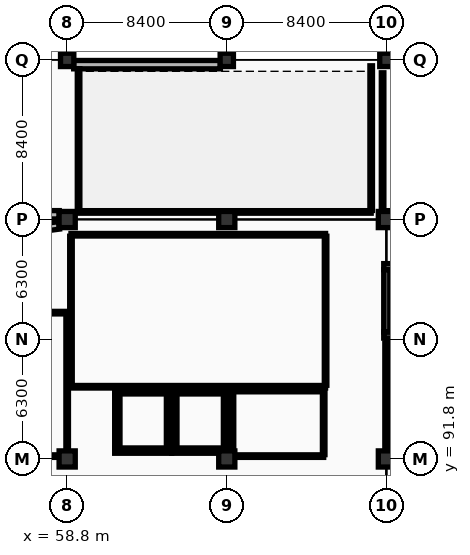
"""IFC4 building model, lengths in metres.
Left out: names, types, materials, properties, quantities, classifications, styles, units other than length and angle.
Written with IfcOpenShell. Run it as: python <this file> out.ifc"""

import sys

from ifc_helpers import new_model, si_unit, direction, frame, frame_2d, origin, origin_2d, place, context, subcontext, project, spatial, rectangle, extrude, element, fill, save


model = new_model("IFC4")
c1 = context("Model", 3, precision=1e-05, world=origin(), true_north=direction((0.0, 1.0)))
c2 = subcontext(c1, "Body", "Model", "MODEL_VIEW")
j1 = project(units=[si_unit("LENGTHUNIT", "METRE"), si_unit("PLANEANGLEUNIT", "RADIAN")], contexts=[c1])
p1 = place(None, origin())
s1 = spatial("IfcSite", under=j1, at=p1, CompositionType="ELEMENT")
p2 = place(p1, origin())
s2 = spatial("IfcBuilding", under=s1, at=p2, CompositionType="ELEMENT")
p3 = place(p2, origin())
s3 = spatial("IfcBuildingStorey", under=s2, at=p3, CompositionType="ELEMENT", Elevation=0.0)
for number, where, z_axis, x_axis in (
    (1, (58.8, 91.8, 0.0), (0.0, 0.0, 1.0), (1.0, 0.0, 0.0)),
    (2, (58.8, 104.4, 0.0), (0.0, 0.0, 1.0), (1.0, 0.0, 0.0)),
):
    element("IfcColumn", number, at=place(p3, frame(where, z_axis=z_axis, x_axis=x_axis)), inside=s3, PredefinedType="COLUMN", context=c2, shape_type="SweptSolid", body=[
        extrude(rectangle(XDim=0.85, YDim=0.85, at=origin_2d()), origin(), (0.0, 0.0, 1.0), 5.4),
    ])
p4 = place(p3, frame((58.8, 112.8, 0.0), z_axis=(0.0, 0.0, 1.0), x_axis=(1.0, 0.0, 0.0)))
e3 = element("IfcColumn", 3, at=p4, inside=s3, PredefinedType="COLUMN", context=c2, shape_type="SweptSolid", body=[
    extrude(rectangle(XDim=0.7, YDim=0.7, at=origin_2d()), origin(), (0.0, 0.0, 1.0), 5.4),
])
for number, where, z_axis, x_axis in (
    (4, (67.2, 91.8, 0.0), (0.0, 0.0, 1.0), (1.0, 0.0, 0.0)),
    (5, (67.2, 104.4, 0.0), (0.0, 0.0, 1.0), (1.0, 0.0, 0.0)),
):
    element("IfcColumn", number, at=place(p3, frame(where, z_axis=z_axis, x_axis=x_axis)), inside=s3, PredefinedType="COLUMN", context=c2, shape_type="SweptSolid", body=[
        extrude(rectangle(XDim=0.85, YDim=0.85, at=origin_2d()), origin(), (0.0, 0.0, 1.0), 5.4),
    ])
p5 = place(p3, frame((67.2, 112.8, 0.0), z_axis=(0.0, 0.0, 1.0), x_axis=(1.0, 0.0, 0.0)))
e6 = element("IfcColumn", 6, at=p5, inside=s3, PredefinedType="COLUMN", context=c2, shape_type="SweptSolid", body=[
    extrude(rectangle(XDim=0.7, YDim=0.7, at=origin_2d()), origin(), (0.0, 0.0, 1.0), 5.4),
])
for number, where, z_axis, x_axis in (
    (7, (75.6, 91.8, 0.0), (0.0, 0.0, 1.0), (1.0, 0.0, 0.0)),
    (8, (75.6, 104.4, 0.0), (0.0, 0.0, 1.0), (1.0, 0.0, 0.0)),
):
    element("IfcColumn", number, at=place(p3, frame(where, z_axis=z_axis, x_axis=x_axis)), inside=s3, PredefinedType="COLUMN", context=c2, shape_type="SweptSolid", body=[
        extrude(rectangle(XDim=0.85, YDim=0.85, at=origin_2d()), origin(), (0.0, 0.0, 1.0), 5.4),
    ])
p6 = place(p3, frame((75.6, 112.8, 0.0), z_axis=(0.0, 0.0, 1.0), x_axis=(1.0, 0.0, 0.0)))
e9 = element("IfcColumn", 9, at=p6, inside=s3, PredefinedType="COLUMN", context=c2, shape_type="SweptSolid", body=[
    extrude(rectangle(XDim=0.7, YDim=0.7, at=origin_2d()), origin(), (0.0, 0.0, 1.0), 5.4),
])
p7 = place(p3, frame((59.142, 112.55, 0.0), z_axis=(0.0, 0.0, 1.0), x_axis=(1.0, 0.0, 0.0)))
e10 = element("IfcWall", 10, at=p7, inside=s3, PredefinedType="STANDARD", context=c2, shape_type="SweptSolid", body=[
    extrude(rectangle(XDim=7.721, YDim=0.44, at=frame_2d((3.86, 0.0))), origin(), (0.0, 0.0, 1.0), 4.67),
])
p8 = place(p7, frame((2.658, 0.0, 0.0)))
e11 = element("IfcOpeningElement", 11, at=p8, cuts=e10, PredefinedType="OPENING", context=c2, shape_type="SweptSolid", body=[
    extrude(rectangle(XDim=2.4, YDim=2.8, at=frame_2d((1.2, 1.4))), frame((0.0, 0.23, 0.0), z_axis=(0.0, -1.0, 0.0), x_axis=(1.0, 0.0, 0.0)), (0.0, 0.0, 1.0), 0.46),
])
p9 = place(p3, frame((58.383, 104.65, 0.0), z_axis=(0.0, 0.0, 1.0), x_axis=(-1.0, 0.0, 0.0)))
e12 = element("IfcWall", 12, at=p9, inside=s3, PredefinedType="STANDARD", context=c2, shape_type="SweptSolid", body=[
    extrude(rectangle(XDim=11.683, YDim=0.44, at=frame_2d((5.842, 0.0))), origin(), (0.0, 0.0, 1.0), 4.22),
])
p10 = place(p9, frame((2.658, 0.0, 0.9)))
e13 = element("IfcOpeningElement", 13, at=p10, cuts=e12, PredefinedType="OPENING", context=c2, shape_type="SweptSolid", body=[
    extrude(rectangle(XDim=1.2, YDim=1.85, at=frame_2d((0.6, 0.925))), frame((0.0, 0.23, 0.0), z_axis=(0.0, -1.0, 0.0), x_axis=(1.0, 0.0, 0.0)), (0.0, 0.0, 1.0), 0.46),
])
p11 = place(p9, frame((7.908, 0.0, 0.9)))
e14 = element("IfcOpeningElement", 14, at=p11, cuts=e12, PredefinedType="OPENING", context=c2, shape_type="SweptSolid", body=[
    extrude(rectangle(XDim=1.2, YDim=1.85, at=frame_2d((0.6, 0.925))), frame((0.0, 0.23, 0.0), z_axis=(0.0, -1.0, 0.0), x_axis=(1.0, 0.0, 0.0)), (0.0, 0.0, 1.0), 0.46),
])
p12 = place(p3, frame((58.372, 104.091, 0.0), z_axis=(0.0, 0.0, 1.0), x_axis=(-0.991455178228, -0.130447803989, 0.0)))
e15 = element("IfcWall", 15, at=p12, inside=s3, PredefinedType="ELEMENTEDWALL", context=c2, shape_type="SweptSolid", body=[
    extrude(rectangle(XDim=2.824, YDim=0.395, at=frame_2d((1.412, 0.0))), origin(), (0.0, 0.0, 1.0), 4.27),
])
p13 = place(p12, frame((0.962, 0.0, 0.85)))
e16 = element("IfcOpeningElement", 16, at=p13, cuts=e15, PredefinedType="OPENING", context=c2, shape_type="SweptSolid", body=[
    extrude(rectangle(XDim=0.9, YDim=1.85, at=frame_2d((0.45, 0.925))), frame((0.0, 0.208, 0.0), z_axis=(0.0, -1.0, 0.0), x_axis=(1.0, 0.0, 0.0)), (0.0, 0.0, 1.0), 0.415),
])
for number, where, z_axis, x_axis in (
    (17, (75.46, 101.92, 0.0), (0.0, 0.0, 1.0), (1.0, 0.0, 0.0)),
    (18, (84.54, 98.32, 0.0), (0.0, 0.0, 1.0), (-1.0, 0.0, 0.0)),
):
    element("IfcWall", number, at=place(p3, frame(where, z_axis=z_axis, x_axis=x_axis)), inside=s3, PredefinedType="SHEAR", context=c2, shape_type="SweptSolid", body=[
        extrude(rectangle(XDim=9.08, YDim=0.32, at=frame_2d((4.54, 0.0))), origin(), (0.0, 0.0, 1.0), 5.14),
    ])
p14 = place(p3, frame((75.62, 98.48, 0.0), z_axis=(0.0, 0.0, 1.0), x_axis=(0.0, 1.0, 0.0)))
e19 = element("IfcWall", 19, at=p14, inside=s3, PredefinedType="SHEAR", context=c2, shape_type="SweptSolid", body=[
    extrude(rectangle(XDim=3.28, YDim=0.32, at=frame_2d((1.64, 0.0))), origin(), (0.0, 0.0, 1.0), 5.14),
])
p15 = place(p14, frame((1.065, 0.0, 0.0)))
e20 = element("IfcOpeningElement", 20, at=p15, cuts=e19, PredefinedType="OPENING", context=c2, shape_type="SweptSolid", body=[
    extrude(rectangle(XDim=1.15, YDim=2.2, at=frame_2d((0.575, 1.1))), frame((0.0, 0.17, 0.0), z_axis=(0.0, -1.0, 0.0), x_axis=(1.0, 0.0, 0.0)), (0.0, 0.0, 1.0), 0.34),
])
p16 = place(p3, frame((61.3, 95.36, 0.0), z_axis=(0.0, 0.0, 1.0), x_axis=(1.0, 0.0, 0.0)))
e21 = element("IfcWall", 21, at=p16, inside=s3, PredefinedType="SHEAR", context=c2, shape_type="SweptSolid", body=[
    extrude(rectangle(XDim=3.0, YDim=0.28, at=frame_2d((1.5, 0.0))), origin(), (0.0, 0.0, 1.0), 5.14),
])
p17 = place(p3, frame((64.3, 92.24, 0.0), z_axis=(0.0, 0.0, 1.0), x_axis=(-1.0, 0.0, 0.0)))
e22 = element("IfcWall", 22, at=p17, inside=s3, PredefinedType="SHEAR", context=c2, shape_type="SweptSolid", body=[
    extrude(rectangle(XDim=3.0, YDim=0.28, at=frame_2d((1.5, 0.0))), origin(), (0.0, 0.0, 1.0), 5.14),
])
p18 = place(p17, frame((0.975, 0.0, 0.0)))
e23 = element("IfcOpeningElement", 23, at=p18, cuts=e22, PredefinedType="OPENING", context=c2, shape_type="SweptSolid", body=[
    extrude(rectangle(XDim=1.05, YDim=2.2, at=frame_2d((0.525, 1.1))), frame((0.0, 0.15, 0.0), z_axis=(0.0, -1.0, 0.0), x_axis=(1.0, 0.0, 0.0)), (0.0, 0.0, 1.0), 0.3),
])
for number, where, z_axis, x_axis in (
    (24, (61.44, 92.38, 0.0), (0.0, 0.0, 1.0), (0.0, 1.0, 0.0)),
    (25, (64.16, 95.22, 0.0), (0.0, 0.0, 1.0), (0.0, -1.0, 0.0)),
):
    element("IfcWall", number, at=place(p3, frame(where, z_axis=z_axis, x_axis=x_axis)), inside=s3, PredefinedType="SHEAR", context=c2, shape_type="SweptSolid", body=[
        extrude(rectangle(XDim=2.84, YDim=0.28, at=frame_2d((1.42, 0.0))), origin(), (0.0, 0.0, 1.0), 5.14),
    ])
p19 = place(p3, frame((64.3, 95.36, 0.0), z_axis=(0.0, 0.0, 1.0), x_axis=(1.0, 0.0, 0.0)))
e26 = element("IfcWall", 26, at=p19, inside=s3, PredefinedType="SHEAR", context=c2, shape_type="SweptSolid", body=[
    extrude(rectangle(XDim=3.0, YDim=0.28, at=frame_2d((1.5, 0.0))), origin(), (0.0, 0.0, 1.0), 5.14),
])
p20 = place(p3, frame((67.3, 92.24, 0.0), z_axis=(0.0, 0.0, 1.0), x_axis=(-1.0, 0.0, 0.0)))
e27 = element("IfcWall", 27, at=p20, inside=s3, PredefinedType="SHEAR", context=c2, shape_type="SweptSolid", body=[
    extrude(rectangle(XDim=3.0, YDim=0.28, at=frame_2d((1.5, 0.0))), origin(), (0.0, 0.0, 1.0), 5.14),
])
p21 = place(p20, frame((0.975, 0.0, 0.0)))
e28 = element("IfcOpeningElement", 28, at=p21, cuts=e27, PredefinedType="OPENING", context=c2, shape_type="SweptSolid", body=[
    extrude(rectangle(XDim=1.05, YDim=2.2, at=frame_2d((0.525, 1.1))), frame((0.0, 0.15, 0.0), z_axis=(0.0, -1.0, 0.0), x_axis=(1.0, 0.0, 0.0)), (0.0, 0.0, 1.0), 0.3),
])
for number, where, z_axis, x_axis in (
    (29, (64.44, 92.38, 0.0), (0.0, 0.0, 1.0), (0.0, 1.0, 0.0)),
    (30, (67.16, 95.22, 0.0), (0.0, 0.0, 1.0), (0.0, -1.0, 0.0)),
):
    element("IfcWall", number, at=place(p3, frame(where, z_axis=z_axis, x_axis=x_axis)), inside=s3, PredefinedType="SHEAR", context=c2, shape_type="SweptSolid", body=[
        extrude(rectangle(XDim=2.84, YDim=0.28, at=frame_2d((1.42, 0.0))), origin(), (0.0, 0.0, 1.0), 5.14),
    ])
p22 = place(p3, frame((74.8, 104.8, 0.0), z_axis=(0.0, 0.0, 1.0), x_axis=(-1.0, 0.0, 0.0)))
e31 = element("IfcWall", 31, at=p22, inside=s3, PredefinedType="PARTITIONING", context=c2, shape_type="SweptSolid", body=[
    extrude(rectangle(XDim=15.4, YDim=0.135, at=frame_2d((7.7, 0.0))), origin(), (0.0, 0.0, 1.0), 4.27),
])
p23 = place(p22, frame((2.413, 0.0, 0.0)))
e32 = element("IfcOpeningElement", 32, at=p23, cuts=e31, PredefinedType="OPENING", context=c2, shape_type="SweptSolid", body=[
    extrude(rectangle(XDim=0.95, YDim=2.15, at=frame_2d((0.475, 1.075))), frame((0.0, 0.077, 0.0), z_axis=(0.0, -1.0, 0.0), x_axis=(1.0, 0.0, 0.0)), (0.0, 0.0, 1.0), 0.155),
])
p24 = place(p3, frame((59.4, 104.877, 0.0), z_axis=(0.0, 0.0, 1.0), x_axis=(0.0, 1.0, 0.0)))
e33 = element("IfcWall", 33, at=p24, inside=s3, PredefinedType="PARTITIONING", context=c2, shape_type="SweptSolid", body=[
    extrude(rectangle(XDim=7.458, YDim=0.135, at=frame_2d((3.729, 0.0))), origin(), (0.0, 0.0, 1.0), 4.79),
])
p25 = place(p3, frame((74.8, 112.49, 0.0), z_axis=(0.0, 0.0, 1.0), x_axis=(0.0, -1.0, 0.0)))
e34 = element("IfcWall", 34, at=p25, inside=s3, PredefinedType="PARTITIONING", context=c2, shape_type="SweptSolid", body=[
    extrude(rectangle(XDim=7.613, YDim=0.135, at=frame_2d((3.806, 0.0))), origin(), (0.0, 0.0, 1.0), 4.67),
])
p26 = place(p3, frame((101.566, 104.8, 0.0), z_axis=(0.0, 0.0, 1.0), x_axis=(-1.0, 0.0, 0.0)))
e35 = element("IfcWall", 35, at=p26, inside=s3, PredefinedType="PARTITIONING", context=c2, shape_type="SweptSolid", body=[
    extrude(rectangle(XDim=26.166, YDim=0.135, at=frame_2d((13.083, 0.0))), origin(), (0.0, 0.0, 1.0), 4.27),
])
p27 = place(p26, frame((21.189, 0.0, 0.0)))
e36 = element("IfcOpeningElement", 36, at=p27, cuts=e35, PredefinedType="OPENING", context=c2, shape_type="SweptSolid", body=[
    extrude(rectangle(XDim=0.95, YDim=2.15, at=frame_2d((0.475, 1.075))), frame((0.0, 0.077, 0.0), z_axis=(0.0, -1.0, 0.0), x_axis=(1.0, 0.0, 0.0)), (0.0, 0.0, 1.0), 0.155),
])
p28 = place(p3, frame((75.4, 104.877, 0.0), z_axis=(0.0, 0.0, 1.0), x_axis=(0.0, 1.0, 0.0)))
e37 = element("IfcWall", 37, at=p28, inside=s3, PredefinedType="PARTITIONING", context=c2, shape_type="SweptSolid", body=[
    extrude(rectangle(XDim=7.245, YDim=0.135, at=frame_2d((3.623, 0.0))), origin(), (0.0, 0.0, 1.0), 4.27),
])
for number, where, z_axis, x_axis in (
    (38, (59.0, 103.6, 0.0), (0.0, 0.0, 1.0), (1.0, 0.0, 0.0)),
    (39, (72.4, 95.6, 0.0), (0.0, 0.0, 1.0), (-1.0, 0.0, 0.0)),
):
    element("IfcWall", number, at=place(p3, frame(where, z_axis=z_axis, x_axis=x_axis)), inside=s3, PredefinedType="PARTITIONING", context=c2, shape_type="SweptSolid", body=[
        extrude(rectangle(XDim=13.4, YDim=0.135, at=frame_2d((6.7, 0.0))), origin(), (0.0, 0.0, 1.0), 4.27),
    ])
p29 = place(p3, frame((59.0, 95.677, 0.0), z_axis=(0.0, 0.0, 1.0), x_axis=(0.0, 1.0, 0.0)))
e40 = element("IfcWall", 40, at=p29, inside=s3, PredefinedType="PARTITIONING", context=c2, shape_type="SweptSolid", body=[
    extrude(rectangle(XDim=7.845, YDim=0.135, at=frame_2d((3.922, 0.0))), origin(), (0.0, 0.0, 1.0), 4.27),
])
p30 = place(p3, frame((72.4, 103.522, 0.0), z_axis=(0.0, 0.0, 1.0), x_axis=(0.0, -1.0, 0.0)))
e41 = element("IfcWall", 41, at=p30, inside=s3, PredefinedType="PARTITIONING", context=c2, shape_type="SweptSolid", body=[
    extrude(rectangle(XDim=7.845, YDim=0.135, at=frame_2d((3.922, 0.0))), origin(), (0.0, 0.0, 1.0), 4.52),
])
p31 = place(p30, frame((2.518, 0.0, 0.0)))
e42 = element("IfcOpeningElement", 42, at=p31, cuts=e41, PredefinedType="OPENING", context=c2, shape_type="SweptSolid", body=[
    extrude(rectangle(XDim=0.95, YDim=2.15, at=frame_2d((0.475, 1.075))), frame((0.0, 0.077, 0.0), z_axis=(0.0, -1.0, 0.0), x_axis=(1.0, 0.0, 0.0)), (0.0, 0.0, 1.0), 0.155),
])
p32 = place(p3, frame((67.5, 95.4, 0.0), z_axis=(0.0, 0.0, 1.0), x_axis=(1.0, 0.0, 0.0)))
e43 = element("IfcWall", 43, at=p32, inside=s3, PredefinedType="PARTITIONING", context=c2, shape_type="SweptSolid", body=[
    extrude(rectangle(XDim=4.8, YDim=0.135, at=frame_2d((2.4, 0.0))), origin(), (0.0, 0.0, 1.0), 4.27),
])
p33 = place(p3, frame((72.3, 91.95, 0.0), z_axis=(0.0, 0.0, 1.0), x_axis=(-1.0, 0.0, 0.0)))
e44 = element("IfcWall", 44, at=p33, inside=s3, PredefinedType="PARTITIONING", context=c2, shape_type="SweptSolid", body=[
    extrude(rectangle(XDim=4.8, YDim=0.135, at=frame_2d((2.4, 0.0))), origin(), (0.0, 0.0, 1.0), 4.27),
])
p34 = place(p33, frame((1.61, 0.0, 0.0)))
e45 = element("IfcOpeningElement", 45, at=p34, cuts=e44, PredefinedType="OPENING", context=c2, shape_type="SweptSolid", body=[
    extrude(rectangle(XDim=0.95, YDim=2.15, at=frame_2d((0.475, 1.075))), frame((0.0, 0.077, 0.0), z_axis=(0.0, -1.0, 0.0), x_axis=(1.0, 0.0, 0.0)), (0.0, 0.0, 1.0), 0.155),
])
p35 = place(p3, frame((67.5, 92.028, 0.0), z_axis=(0.0, 0.0, 1.0), x_axis=(0.0, 1.0, 0.0)))
e46 = element("IfcWall", 46, at=p35, inside=s3, PredefinedType="PARTITIONING", context=c2, shape_type="SweptSolid", body=[
    extrude(rectangle(XDim=3.295, YDim=0.135, at=frame_2d((1.647, 0.0))), origin(), (0.0, 0.0, 1.0), 4.27),
])
p36 = place(p3, frame((72.3, 95.323, 0.0), z_axis=(0.0, 0.0, 1.0), x_axis=(0.0, -1.0, 0.0)))
e47 = element("IfcWall", 47, at=p36, inside=s3, PredefinedType="PARTITIONING", context=c2, shape_type="SweptSolid", body=[
    extrude(rectangle(XDim=3.295, YDim=0.135, at=frame_2d((1.647, 0.0))), origin(), (0.0, 0.0, 1.0), 4.47),
])
p37 = place(p3, frame((75.6, 98.0, 0.0), z_axis=(0.0, 0.0, 1.0), x_axis=(1.0, 0.0, 0.0)))
e48 = element("IfcWall", 48, at=p37, inside=s3, PredefinedType="PARTITIONING", context=c2, shape_type="SweptSolid", body=[
    extrude(rectangle(XDim=8.8, YDim=0.165, at=frame_2d((4.4, 0.0))), origin(), (0.0, 0.0, 1.0), 4.27),
])
p38 = place(p3, frame((84.4, 91.95, 0.0), z_axis=(0.0, 0.0, 1.0), x_axis=(-1.0, 0.0, 0.0)))
e49 = element("IfcWall", 49, at=p38, inside=s3, PredefinedType="PARTITIONING", context=c2, shape_type="SweptSolid", body=[
    extrude(rectangle(XDim=8.8, YDim=0.165, at=frame_2d((4.4, 0.0))), origin(), (0.0, 0.0, 1.0), 4.27),
])
p39 = place(p38, frame((4.61, 0.0, 0.0)))
e50 = element("IfcOpeningElement", 50, at=p39, cuts=e49, PredefinedType="OPENING", context=c2, shape_type="SweptSolid", body=[
    extrude(rectangle(XDim=1.0, YDim=2.15, at=frame_2d((0.5, 1.075))), frame((0.0, 0.093, 0.0), z_axis=(0.0, -1.0, 0.0), x_axis=(1.0, 0.0, 0.0)), (0.0, 0.0, 1.0), 0.185),
])
p40 = place(p3, frame((75.6, 92.042, 0.0), z_axis=(0.0, 0.0, 1.0), x_axis=(0.0, 1.0, 0.0)))
e51 = element("IfcWall", 51, at=p40, inside=s3, PredefinedType="PARTITIONING", context=c2, shape_type="SweptSolid", body=[
    extrude(rectangle(XDim=5.865, YDim=0.165, at=frame_2d((2.933, 0.0))), origin(), (0.0, 0.0, 1.0), 4.27),
])
p41 = place(p3, frame((49.3, 99.5, 0.0), z_axis=(0.0, 0.0, 1.0), x_axis=(1.0, 0.0, 0.0)))
e52 = element("IfcWall", 52, at=p41, inside=s3, PredefinedType="PARTITIONING", context=c2, shape_type="SweptSolid", body=[
    extrude(rectangle(XDim=9.5, YDim=0.135, at=frame_2d((4.75, 0.0))), origin(), (0.0, 0.0, 1.0), 4.17),
])
p42 = place(p3, frame((58.8, 91.95, 0.0), z_axis=(0.0, 0.0, 1.0), x_axis=(-1.0, 0.0, 0.0)))
e53 = element("IfcWall", 53, at=p42, inside=s3, PredefinedType="PARTITIONING", context=c2, shape_type="SweptSolid", body=[
    extrude(rectangle(XDim=9.5, YDim=0.135, at=frame_2d((4.75, 0.0))), origin(), (0.0, 0.0, 1.0), 4.17),
])
p43 = place(p42, frame((3.073, 0.0, 0.0)))
e54 = element("IfcOpeningElement", 54, at=p43, cuts=e53, PredefinedType="OPENING", context=c2, shape_type="SweptSolid", body=[
    extrude(rectangle(XDim=1.02, YDim=2.15, at=frame_2d((0.51, 1.075))), frame((0.0, 0.077, 0.0), z_axis=(0.0, -1.0, 0.0), x_axis=(1.0, 0.0, 0.0)), (0.0, 0.0, 1.0), 0.155),
])
p44 = place(p3, frame((58.8, 99.423, 0.0), z_axis=(0.0, 0.0, 1.0), x_axis=(0.0, -1.0, 0.0)))
e55 = element("IfcWall", 55, at=p44, inside=s3, PredefinedType="PARTITIONING", context=c2, shape_type="SweptSolid", body=[
    extrude(rectangle(XDim=7.395, YDim=0.135, at=frame_2d((3.698, 0.0))), origin(), (0.0, 0.0, 1.0), 4.27),
])
p45 = place(p8, origin())
e56 = element("IfcDoor", 56, at=p45, inside=s3, OperationType="DOUBLE_DOOR_SINGLE_SWING", PredefinedType="DOOR", context=c2, shape_type="SweptSolid", body=[
    extrude(rectangle(XDim=2.4, YDim=2.8, at=frame_2d((1.2, 1.4))), frame((0.0, 0.025, 0.0), z_axis=(0.0, -1.0, 0.0), x_axis=(1.0, 0.0, 0.0)), (0.0, 0.0, 1.0), 0.05),
])
fill(e11, e56)
p46 = place(p15, origin())
e57 = element("IfcDoor", 57, at=p46, inside=s3, OperationType="SINGLE_SWING_LEFT", PredefinedType="DOOR", context=c2, shape_type="SweptSolid", body=[
    extrude(rectangle(XDim=1.15, YDim=2.2, at=frame_2d((0.575, 1.1))), frame((0.0, 0.025, 0.0), z_axis=(0.0, -1.0, 0.0), x_axis=(1.0, 0.0, 0.0)), (0.0, 0.0, 1.0), 0.05),
])
fill(e20, e57)
p47 = place(p18, origin())
e58 = element("IfcDoor", 58, at=p47, inside=s3, OperationType="DOUBLE_DOOR_SLIDING", PredefinedType="DOOR", context=c2, shape_type="SweptSolid", body=[
    extrude(rectangle(XDim=1.05, YDim=2.2, at=frame_2d((0.525, 1.1))), frame((0.0, 0.025, 0.0), z_axis=(0.0, -1.0, 0.0), x_axis=(1.0, 0.0, 0.0)), (0.0, 0.0, 1.0), 0.05),
])
fill(e23, e58)
p48 = place(p21, origin())
e59 = element("IfcDoor", 59, at=p48, inside=s3, OperationType="DOUBLE_DOOR_SLIDING", PredefinedType="DOOR", context=c2, shape_type="SweptSolid", body=[
    extrude(rectangle(XDim=1.05, YDim=2.2, at=frame_2d((0.525, 1.1))), frame((0.0, 0.025, 0.0), z_axis=(0.0, -1.0, 0.0), x_axis=(1.0, 0.0, 0.0)), (0.0, 0.0, 1.0), 0.05),
])
fill(e28, e59)
p49 = place(p23, origin())
e60 = element("IfcDoor", 60, at=p49, inside=s3, OperationType="SINGLE_SWING_RIGHT", PredefinedType="DOOR", context=c2, shape_type="SweptSolid", body=[
    extrude(rectangle(XDim=0.95, YDim=2.15, at=frame_2d((0.475, 1.075))), frame((0.0, 0.025, 0.0), z_axis=(0.0, -1.0, 0.0), x_axis=(1.0, 0.0, 0.0)), (0.0, 0.0, 1.0), 0.05),
])
fill(e32, e60)
p50 = place(p31, origin())
e61 = element("IfcDoor", 61, at=p50, inside=s3, OperationType="SINGLE_SWING_LEFT", PredefinedType="DOOR", context=c2, shape_type="SweptSolid", body=[
    extrude(rectangle(XDim=0.95, YDim=2.15, at=frame_2d((0.475, 1.075))), frame((0.0, 0.025, 0.0), z_axis=(0.0, -1.0, 0.0), x_axis=(1.0, 0.0, 0.0)), (0.0, 0.0, 1.0), 0.05),
])
fill(e42, e61)
p51 = place(p34, origin())
e62 = element("IfcDoor", 62, at=p51, inside=s3, OperationType="SINGLE_SWING_RIGHT", PredefinedType="DOOR", context=c2, shape_type="SweptSolid", body=[
    extrude(rectangle(XDim=0.95, YDim=2.15, at=frame_2d((0.475, 1.075))), frame((0.0, 0.025, 0.0), z_axis=(0.0, -1.0, 0.0), x_axis=(1.0, 0.0, 0.0)), (0.0, 0.0, 1.0), 0.05),
])
fill(e45, e62)
save(model, sys.argv[1])
